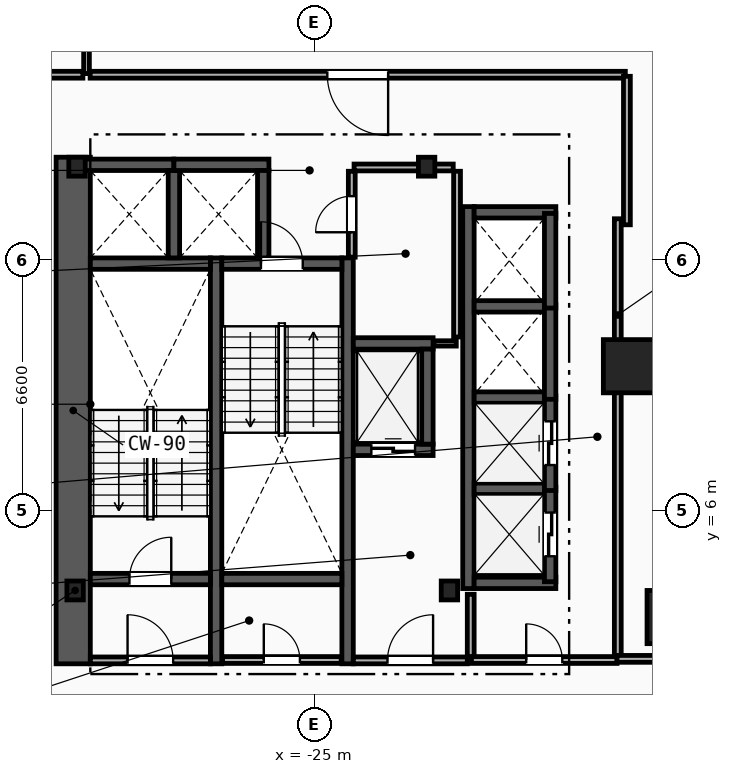
"""IFC4 building model, lengths in metres.
Left out: names, types, materials, properties, quantities, classifications, styles, units other than length and angle.
Written with IfcOpenShell. Run it as: python <this file> out.ifc"""

import sys

from ifc_helpers import new_model, si_unit, direction, frame, frame_2d, origin, origin_2d, place, context, subcontext, project, spatial, rectangle, i_section, extrude, element, fill, save


model = new_model("IFC4")
c1 = context("Model", 3, precision=1e-05, world=origin(), true_north=direction((0.0, 1.0)))
c2 = subcontext(c1, "Body", "Model", "MODEL_VIEW")
j1 = project(units=[si_unit("LENGTHUNIT", "METRE"), si_unit("PLANEANGLEUNIT", "RADIAN")], contexts=[c1])
p1 = place(None, origin())
s1 = spatial("IfcSite", under=j1, at=p1, CompositionType="ELEMENT")
p2 = place(p1, origin())
s2 = spatial("IfcBuilding", under=s1, at=p2, CompositionType="ELEMENT")
p3 = place(p2, frame((0.0, 0.0, 16.0)))
s3 = spatial("IfcBuildingStorey", under=s2, at=p3, CompositionType="ELEMENT", Elevation=16.0)
for number, where, z_axis, x_axis in (
    (1, (-31.3, 3.9, 0.0), (0.0, 0.0, 1.0), (1.0, 0.0, 0.0)),
    (2, (-21.45, 3.9, 0.0), (0.0, 0.0, 1.0), (1.0, 0.0, 0.0)),
    (3, (-22.05, 15.05, 0.0), (0.0, 0.0, 1.0), (1.0, 0.0, 0.0)),
    (4, (-31.25, 15.05, 0.0), (0.0, 0.0, 1.0), (1.0, 0.0, 0.0)),
):
    element("IfcColumn", number, at=place(p3, frame(where, z_axis=z_axis, x_axis=x_axis)), inside=s3, PredefinedType="COLUMN", context=c2, shape_type="SweptSolid", body=[
        extrude(i_section(OverallWidth=0.432, OverallDepth=0.498, WebThickness=0.056, FlangeThickness=0.089, FilletRadius=0.018, at=origin_2d()), origin(), (0.0, 0.0, 1.0), 4.0),
    ])
for number, where, z_axis, x_axis in (
    (5, (-15.55, 3.2, 0.0), (0.0, 0.0, 1.0), (1.0, 0.0, 0.0)),
    (6, (-16.7, 9.8, 0.0), (0.0, 0.0, 1.0), (1.0, 0.0, 0.0)),
):
    element("IfcColumn", number, at=place(p3, frame(where, z_axis=z_axis, x_axis=x_axis)), inside=s3, PredefinedType="COLUMN", context=c2, shape_type="SweptSolid", body=[
        extrude(rectangle(XDim=1.4, YDim=1.4, at=origin_2d()), origin(), (0.0, 0.0, 1.0), 4.0),
    ])
p4 = place(p3, frame((-31.35, 1.97, 0.0), z_axis=(0.0, 0.0, 1.0), x_axis=(0.0, 1.0, 0.0)))
e7 = element("IfcWall", 7, at=p4, inside=s3, PredefinedType="SHEAR", context=c2, shape_type="SweptSolid", body=[
    extrude(rectangle(XDim=13.33, YDim=0.9, at=frame_2d((6.665, 0.0))), origin(), (0.0, 0.0, 1.0), 3.65),
])
for number, where, z_axis, x_axis in (
    (8, (-27.59, 1.97, 0.0), (0.0, 0.0, 1.0), (0.0, 1.0, 0.0)),
    (9, (-24.13, 1.97, 0.0), (0.0, 0.0, 1.0), (0.0, 1.0, 0.0)),
):
    element("IfcWall", number, at=place(p3, frame(where, z_axis=z_axis, x_axis=x_axis)), inside=s3, PredefinedType="SHEAR", context=c2, shape_type="SweptSolid", body=[
        extrude(rectangle(XDim=10.68, YDim=0.3, at=frame_2d((5.34, 0.0))), origin(), (0.0, 0.0, 1.0), 3.65),
    ])
p5 = place(p3, frame((-30.9, 4.2, 0.0), z_axis=(0.0, 0.0, 1.0), x_axis=(1.0, 0.0, 0.0)))
e10 = element("IfcWall", 10, at=p5, inside=s3, PredefinedType="SHEAR", context=c2, shape_type="SweptSolid", body=[
    extrude(rectangle(XDim=3.16, YDim=0.3, at=frame_2d((1.58, 0.0))), origin(), (0.0, 0.0, 1.0), 3.65),
])
p6 = place(p5, frame((1.03, 0.0, 0.0)))
e11 = element("IfcOpeningElement", 11, at=p6, cuts=e10, PredefinedType="OPENING", context=c2, shape_type="SweptSolid", body=[
    extrude(rectangle(XDim=1.1, YDim=2.15, at=frame_2d((0.55, 1.075))), frame((0.0, 0.16, 0.0), z_axis=(0.0, -1.0, 0.0), x_axis=(1.0, 0.0, 0.0)), (0.0, 0.0, 1.0), 0.32),
])
p7 = place(p3, frame((-30.9, 12.5, 0.0), z_axis=(0.0, 0.0, 1.0), x_axis=(1.0, 0.0, 0.0)))
e12 = element("IfcWall", 12, at=p7, inside=s3, PredefinedType="SHEAR", context=c2, shape_type="SweptSolid", body=[
    extrude(rectangle(XDim=3.16, YDim=0.3, at=frame_2d((1.58, 0.0))), origin(), (0.0, 0.0, 1.0), 3.65),
])
p8 = place(p3, frame((-27.44, 12.5, 0.0), z_axis=(0.0, 0.0, 1.0), x_axis=(1.0, 0.0, 0.0)))
e13 = element("IfcWall", 13, at=p8, inside=s3, PredefinedType="SHEAR", context=c2, shape_type="SweptSolid", body=[
    extrude(rectangle(XDim=3.16, YDim=0.3, at=frame_2d((1.58, 0.0))), origin(), (0.0, 0.0, 1.0), 3.65),
])
p9 = place(p8, frame((1.03, 0.0, 0.0)))
e14 = element("IfcOpeningElement", 14, at=p9, cuts=e13, PredefinedType="OPENING", context=c2, shape_type="SweptSolid", body=[
    extrude(rectangle(XDim=1.1, YDim=2.15, at=frame_2d((0.55, 1.075))), frame((0.0, 0.16, 0.0), z_axis=(0.0, -1.0, 0.0), x_axis=(1.0, 0.0, 0.0)), (0.0, 0.0, 1.0), 0.32),
])
p10 = place(p3, frame((-27.44, 4.2, 0.0), z_axis=(0.0, 0.0, 1.0), x_axis=(1.0, 0.0, 0.0)))
e15 = element("IfcWall", 15, at=p10, inside=s3, PredefinedType="SHEAR", context=c2, shape_type="SweptSolid", body=[
    extrude(rectangle(XDim=3.16, YDim=0.3, at=frame_2d((1.58, 0.0))), origin(), (0.0, 0.0, 1.0), 3.65),
])
p11 = place(p3, frame((-20.89, 2.15, 0.0), z_axis=(0.0, 0.0, 1.0), x_axis=(0.0, 1.0, 0.0)))
e16 = element("IfcWall", 16, at=p11, inside=s3, PredefinedType="PARTITIONING", context=c2, shape_type="SweptSolid", body=[
    extrude(rectangle(XDim=1.65, YDim=0.18, at=frame_2d((0.825, 0.0))), origin(), (0.0, 0.0, 1.0), 3.65),
])
p12 = place(p3, frame((-23.98, 2.06, 0.0), z_axis=(0.0, 0.0, 1.0), x_axis=(1.0, 0.0, 0.0)))
e17 = element("IfcWall", 17, at=p12, inside=s3, PredefinedType="PARTITIONING", context=c2, shape_type="SweptSolid", body=[
    extrude(rectangle(XDim=3.0, YDim=0.18, at=frame_2d((1.5, 0.0))), origin(), (0.0, 0.0, 1.0), 3.65),
])
p13 = place(p12, frame((0.9, 0.0, 0.0)))
e18 = element("IfcOpeningElement", 18, at=p13, cuts=e17, PredefinedType="OPENING", context=c2, shape_type="SweptSolid", body=[
    extrude(rectangle(XDim=1.2, YDim=2.15, at=frame_2d((0.6, 1.075))), frame((0.0, 0.1, 0.0), z_axis=(0.0, -1.0, 0.0), x_axis=(1.0, 0.0, 0.0)), (0.0, 0.0, 1.0), 0.2),
])
p14 = place(p3, frame((-30.9, 2.06, 0.0), z_axis=(0.0, 0.0, 1.0), x_axis=(1.0, 0.0, 0.0)))
e19 = element("IfcWall", 19, at=p14, inside=s3, PredefinedType="PARTITIONING", context=c2, shape_type="SweptSolid", body=[
    extrude(rectangle(XDim=3.16, YDim=0.18, at=frame_2d((1.58, 0.0))), origin(), (0.0, 0.0, 1.0), 3.65),
])
p15 = place(p14, frame((0.98, 0.0, 0.0)))
e20 = element("IfcOpeningElement", 20, at=p15, cuts=e19, PredefinedType="OPENING", context=c2, shape_type="SweptSolid", body=[
    extrude(rectangle(XDim=1.2, YDim=2.15, at=frame_2d((0.6, 1.075))), frame((0.0, 0.1, 0.0), z_axis=(0.0, -1.0, 0.0), x_axis=(1.0, 0.0, 0.0)), (0.0, 0.0, 1.0), 0.2),
])
p16 = place(p3, frame((-23.98, 7.6, 0.0), z_axis=(0.0, 0.0, 1.0), x_axis=(1.0, 0.0, 0.0)))
e21 = element("IfcWall", 21, at=p16, inside=s3, PredefinedType="SHEAR", context=c2, shape_type="SweptSolid", body=[
    extrude(rectangle(XDim=2.1, YDim=0.3, at=frame_2d((1.05, 0.0))), origin(), (0.0, 0.0, 1.0), 3.65),
])
p17 = place(p16, frame((0.475, 0.0, 0.0)))
e22 = element("IfcOpeningElement", 22, at=p17, cuts=e21, PredefinedType="OPENING", context=c2, shape_type="SweptSolid", body=[
    extrude(rectangle(XDim=1.15, YDim=2.2, at=frame_2d((0.575, 1.1))), frame((0.0, 0.16, 0.0), z_axis=(0.0, -1.0, 0.0), x_axis=(1.0, 0.0, 0.0)), (0.0, 0.0, 1.0), 0.32),
])
p18 = place(p3, frame((-23.98, 10.4, 0.0), z_axis=(0.0, 0.0, 1.0), x_axis=(1.0, 0.0, 0.0)))
e23 = element("IfcWall", 23, at=p18, inside=s3, PredefinedType="SHEAR", context=c2, shape_type="SweptSolid", body=[
    extrude(rectangle(XDim=2.1, YDim=0.3, at=frame_2d((1.05, 0.0))), origin(), (0.0, 0.0, 1.0), 3.65),
])
for number, where, z_axis, x_axis in (
    (24, (-22.03, 7.75, 0.0), (0.0, 0.0, 1.0), (0.0, 1.0, 0.0)),
    (25, (-31.2, 15.1, 0.0), (0.0, 0.0, 1.0), (1.0, 0.0, 0.0)),
):
    element("IfcWall", number, at=place(p3, frame(where, z_axis=z_axis, x_axis=x_axis)), inside=s3, PredefinedType="SHEAR", context=c2, shape_type="SweptSolid", body=[
        extrude(rectangle(XDim=2.5, YDim=0.3, at=frame_2d((1.25, 0.0))), origin(), (0.0, 0.0, 1.0), 3.65),
    ])
p19 = place(p3, frame((-28.7, 12.65, 0.0), z_axis=(0.0, 0.0, 1.0), x_axis=(0.0, 1.0, 0.0)))
e26 = element("IfcWall", 26, at=p19, inside=s3, PredefinedType="SHEAR", context=c2, shape_type="SweptSolid", body=[
    extrude(rectangle(XDim=2.3, YDim=0.3, at=frame_2d((1.15, 0.0))), origin(), (0.0, 0.0, 1.0), 3.65),
])
p20 = place(p3, frame((-28.7, 15.1, 0.0), z_axis=(0.0, 0.0, 1.0), x_axis=(1.0, 0.0, 0.0)))
e27 = element("IfcWall", 27, at=p20, inside=s3, PredefinedType="SHEAR", context=c2, shape_type="SweptSolid", body=[
    extrude(rectangle(XDim=2.5, YDim=0.3, at=frame_2d((1.25, 0.0))), origin(), (0.0, 0.0, 1.0), 3.65),
])
p21 = place(p3, frame((-26.35, 12.65, 0.0), z_axis=(0.0, 0.0, 1.0), x_axis=(0.0, 1.0, 0.0)))
e28 = element("IfcWall", 28, at=p21, inside=s3, PredefinedType="SHEAR", context=c2, shape_type="SweptSolid", body=[
    extrude(rectangle(XDim=2.3, YDim=0.3, at=frame_2d((1.15, 0.0))), origin(), (0.0, 0.0, 1.0), 3.65),
])
p22 = place(p3, frame((-20.95, 3.95, 0.0), z_axis=(0.0, 0.0, 1.0), x_axis=(0.0, 1.0, 0.0)))
e29 = element("IfcWall", 29, at=p22, inside=s3, PredefinedType="SHEAR", context=c2, shape_type="SweptSolid", body=[
    extrude(rectangle(XDim=10.05, YDim=0.3, at=frame_2d((5.025, 0.0))), origin(), (0.0, 0.0, 1.0), 3.65),
])
for number, where, z_axis, x_axis in (
    (30, (-20.8, 4.1, 0.0), (0.0, 0.0, 1.0), (1.0, 0.0, 0.0)),
    (31, (-20.8, 13.85, 0.0), (0.0, 0.0, 1.0), (1.0, 0.0, 0.0)),
):
    element("IfcWall", number, at=place(p3, frame(where, z_axis=z_axis, x_axis=x_axis)), inside=s3, PredefinedType="SHEAR", context=c2, shape_type="SweptSolid", body=[
        extrude(rectangle(XDim=2.15, YDim=0.3, at=frame_2d((1.075, 0.0))), origin(), (0.0, 0.0, 1.0), 3.65),
    ])
for number, where, z_axis, x_axis in (
    (32, (-20.8, 6.575, 0.0), (0.0, 0.0, 1.0), (1.0, 0.0, 0.0)),
    (33, (-20.8, 8.975, 0.0), (0.0, 0.0, 1.0), (1.0, 0.0, 0.0)),
    (34, (-20.8, 11.375, 0.0), (0.0, 0.0, 1.0), (1.0, 0.0, 0.0)),
):
    element("IfcWall", number, at=place(p3, frame(where, z_axis=z_axis, x_axis=x_axis)), inside=s3, PredefinedType="SHEAR", context=c2, shape_type="SweptSolid", body=[
        extrude(rectangle(XDim=1.85, YDim=0.3, at=frame_2d((0.925, 0.0))), origin(), (0.0, 0.0, 1.0), 3.65),
    ])
p23 = place(p3, frame((-18.8, 4.13, 0.0), z_axis=(0.0, 0.0, 1.0), x_axis=(0.0, 1.0, 0.0)))
e35 = element("IfcWall", 35, at=p23, inside=s3, PredefinedType="SHEAR", context=c2, shape_type="SweptSolid", body=[
    extrude(rectangle(XDim=2.49, YDim=0.3, at=frame_2d((1.245, 0.0))), origin(), (0.0, 0.0, 1.0), 3.65),
])
p24 = place(p23, frame((0.67, 0.0, 0.0)))
e36 = element("IfcOpeningElement", 36, at=p24, cuts=e35, PredefinedType="OPENING", context=c2, shape_type="SweptSolid", body=[
    extrude(rectangle(XDim=1.15, YDim=2.2, at=frame_2d((0.575, 1.1))), frame((0.0, 0.16, 0.0), z_axis=(0.0, -1.0, 0.0), x_axis=(1.0, 0.0, 0.0)), (0.0, 0.0, 1.0), 0.32),
])
p25 = place(p3, frame((-18.8, 6.53, 0.0), z_axis=(0.0, 0.0, 1.0), x_axis=(0.0, 1.0, 0.0)))
e37 = element("IfcWall", 37, at=p25, inside=s3, PredefinedType="SHEAR", context=c2, shape_type="SweptSolid", body=[
    extrude(rectangle(XDim=2.49, YDim=0.3, at=frame_2d((1.245, 0.0))), origin(), (0.0, 0.0, 1.0), 3.65),
])
p26 = place(p25, frame((0.67, 0.0, 0.0)))
e38 = element("IfcOpeningElement", 38, at=p26, cuts=e37, PredefinedType="OPENING", context=c2, shape_type="SweptSolid", body=[
    extrude(rectangle(XDim=1.15, YDim=2.2, at=frame_2d((0.575, 1.1))), frame((0.0, 0.16, 0.0), z_axis=(0.0, -1.0, 0.0), x_axis=(1.0, 0.0, 0.0)), (0.0, 0.0, 1.0), 0.32),
])
for number, where, z_axis, x_axis in (
    (39, (-18.8, 8.93, 0.0), (0.0, 0.0, 1.0), (0.0, 1.0, 0.0)),
    (40, (-18.8, 11.33, 0.0), (0.0, 0.0, 1.0), (0.0, 1.0, 0.0)),
):
    element("IfcWall", number, at=place(p3, frame(where, z_axis=z_axis, x_axis=x_axis)), inside=s3, PredefinedType="SHEAR", context=c2, shape_type="SweptSolid", body=[
        extrude(rectangle(XDim=2.49, YDim=0.3, at=frame_2d((1.245, 0.0))), origin(), (0.0, 0.0, 1.0), 3.65),
    ])
p27 = place(p3, frame((-17.02, 2.17, 0.0), z_axis=(0.0, 0.0, 1.0), x_axis=(0.0, 1.0, 0.0)))
e41 = element("IfcWall", 41, at=p27, inside=s3, PredefinedType="PARTITIONING", context=c2, shape_type="SweptSolid", body=[
    extrude(rectangle(XDim=11.51, YDim=0.18, at=frame_2d((5.755, 0.0))), origin(), (0.0, 0.0, 1.0), 3.65),
])
p28 = place(p3, frame((-20.87, 2.07, 0.0), z_axis=(0.0, 0.0, 1.0), x_axis=(1.0, 0.0, 0.0)))
e42 = element("IfcWall", 42, at=p28, inside=s3, PredefinedType="PARTITIONING", context=c2, shape_type="SweptSolid", body=[
    extrude(rectangle(XDim=3.83, YDim=0.18, at=frame_2d((1.915, 0.0))), origin(), (0.0, 0.0, 1.0), 3.65),
])
p29 = place(p28, frame((1.44, 0.0, 0.0)))
e43 = element("IfcOpeningElement", 43, at=p29, cuts=e42, PredefinedType="OPENING", context=c2, shape_type="SweptSolid", body=[
    extrude(rectangle(XDim=0.95, YDim=2.1, at=frame_2d((0.475, 1.05))), frame((0.0, 0.1, 0.0), z_axis=(0.0, -1.0, 0.0), x_axis=(1.0, 0.0, 0.0)), (0.0, 0.0, 1.0), 0.2),
])
p30 = place(p3, frame((-21.86, 10.4, 0.0), z_axis=(0.0, 0.0, 1.0), x_axis=(1.0, 0.0, 0.0)))
e44 = element("IfcWall", 44, at=p30, inside=s3, PredefinedType="PARTITIONING", context=c2, shape_type="SweptSolid", body=[
    extrude(rectangle(XDim=0.59, YDim=0.14, at=frame_2d((0.295, 0.0))), origin(), (0.0, 0.0, 1.0), 3.65),
])
p31 = place(p3, frame((-21.25, 10.57, 0.0), z_axis=(0.0, 0.0, 1.0), x_axis=(0.0, 1.0, 0.0)))
e45 = element("IfcWall", 45, at=p31, inside=s3, PredefinedType="PARTITIONING", context=c2, shape_type="SweptSolid", body=[
    extrude(rectangle(XDim=4.36, YDim=0.18, at=frame_2d((2.18, 0.0))), origin(), (0.0, 0.0, 1.0), 3.65),
])
p32 = place(p3, frame((-23.96, 15.03, 0.0), z_axis=(0.0, 0.0, 1.0), x_axis=(1.0, 0.0, 0.0)))
e46 = element("IfcWall", 46, at=p32, inside=s3, PredefinedType="PARTITIONING", context=c2, shape_type="SweptSolid", body=[
    extrude(rectangle(XDim=2.61, YDim=0.18, at=frame_2d((1.305, 0.0))), origin(), (0.0, 0.0, 1.0), 2.723),
])
p33 = place(p3, frame((-27.42, 2.07, 0.0), z_axis=(0.0, 0.0, 1.0), x_axis=(1.0, 0.0, 0.0)))
e47 = element("IfcWall", 47, at=p33, inside=s3, PredefinedType="PARTITIONING", context=c2, shape_type="SweptSolid", body=[
    extrude(rectangle(XDim=3.12, YDim=0.18, at=frame_2d((1.56, 0.0))), origin(), (0.0, 0.0, 1.0), 3.65),
])
p34 = place(p33, frame((1.085, 0.0, 0.0)))
e48 = element("IfcOpeningElement", 48, at=p34, cuts=e47, PredefinedType="OPENING", context=c2, shape_type="SweptSolid", body=[
    extrude(rectangle(XDim=0.95, YDim=2.1, at=frame_2d((0.475, 1.05))), frame((0.0, 0.1, 0.0), z_axis=(0.0, -1.0, 0.0), x_axis=(1.0, 0.0, 0.0)), (0.0, 0.0, 1.0), 0.2),
])
p35 = place(p3, frame((-24.02, 12.67, 0.0), z_axis=(0.0, 0.0, 1.0), x_axis=(0.0, 1.0, 0.0)))
e49 = element("IfcWall", 49, at=p35, inside=s3, PredefinedType="PARTITIONING", context=c2, shape_type="SweptSolid", body=[
    extrude(rectangle(XDim=2.26, YDim=0.18, at=frame_2d((1.13, 0.0))), origin(), (0.0, 0.0, 1.0), 3.65),
])
p36 = place(p35, frame((0.655, 0.0, 0.0)))
e50 = element("IfcOpeningElement", 50, at=p36, cuts=e49, PredefinedType="OPENING", context=c2, shape_type="SweptSolid", body=[
    extrude(rectangle(XDim=0.95, YDim=2.1, at=frame_2d((0.475, 1.05))), frame((0.0, 0.1, 0.0), z_axis=(0.0, -1.0, 0.0), x_axis=(1.0, 0.0, 0.0)), (0.0, 0.0, 1.0), 0.2),
])
p37 = place(p3, frame((-31.0, 17.5, 0.0), z_axis=(0.0, 0.0, 1.0), x_axis=(0.0, 1.0, 0.0)))
e51 = element("IfcWall", 51, at=p37, inside=s3, PredefinedType="PARTITIONING", context=c2, shape_type="SweptSolid", body=[
    extrude(rectangle(XDim=8.471, YDim=0.15, at=frame_2d((4.236, 0.0))), origin(), (0.0, 0.0, 1.0), 3.65),
])
p38 = place(p37, frame((3.536, 0.0, 1.05)))
e52 = element("IfcOpeningElement", 52, at=p38, cuts=e51, PredefinedType="OPENING", context=c2, shape_type="SweptSolid", body=[
    extrude(rectangle(XDim=1.4, YDim=1.5, at=frame_2d((0.7, 0.75))), frame((0.0, 0.085, 0.0), z_axis=(0.0, -1.0, 0.0), x_axis=(1.0, 0.0, 0.0)), (0.0, 0.0, 1.0), 0.17),
])
p39 = place(p3, frame((-31.095, 17.47, 0.0), z_axis=(0.0, 0.0, 1.0), x_axis=(-1.0, 0.0, 0.0)))
e53 = element("IfcWall", 53, at=p39, inside=s3, PredefinedType="PARTITIONING", context=c2, shape_type="SweptSolid", body=[
    extrude(rectangle(XDim=2.533, YDim=0.18, at=frame_2d((1.267, 0.0))), origin(), (0.0, 0.0, 1.0), 2.877),
])
p40 = place(p3, frame((-16.822, 17.47, 0.0), z_axis=(0.0, 0.0, 1.0), x_axis=(-1.0, 0.0, 0.0)))
e54 = element("IfcWall", 54, at=p40, inside=s3, PredefinedType="PARTITIONING", context=c2, shape_type="SweptSolid", body=[
    extrude(rectangle(XDim=14.083, YDim=0.18, at=frame_2d((7.042, 0.0))), origin(), (0.0, 0.0, 1.0), 3.65),
])
p41 = place(p40, frame((6.242, 0.0, 0.0)))
e55 = element("IfcOpeningElement", 55, at=p41, cuts=e54, PredefinedType="OPENING", context=c2, shape_type="SweptSolid", body=[
    extrude(rectangle(XDim=1.6, YDim=2.2, at=frame_2d((0.8, 1.1))), frame((0.0, 0.1, 0.0), z_axis=(0.0, -1.0, 0.0), x_axis=(1.0, 0.0, 0.0)), (0.0, 0.0, 1.0), 0.2),
])
p42 = place(p3, frame((-16.78, 13.521, 0.0), z_axis=(0.0, 0.0, 1.0), x_axis=(0.0, 1.0, 0.0)))
e56 = element("IfcWall", 56, at=p42, inside=s3, PredefinedType="PARTITIONING", context=c2, shape_type="SweptSolid", body=[
    extrude(rectangle(XDim=3.907, YDim=0.18, at=frame_2d((1.954, 0.0))), origin(), (0.0, 0.0, 1.0), 3.65),
])
p43 = place(p3, frame((-15.595, 2.1, 0.0), z_axis=(0.0, 0.0, 1.0), x_axis=(-1.0, 0.0, 0.0)))
e57 = element("IfcWall", 57, at=p43, inside=s3, PredefinedType="PARTITIONING", context=c2, shape_type="SweptSolid", body=[
    extrude(rectangle(XDim=1.445, YDim=0.18, at=frame_2d((0.723, 0.0))), origin(), (0.0, 0.0, 1.0), 3.65),
])
p44 = place(p6, origin())
e58 = element("IfcDoor", 58, at=p44, inside=s3, OperationType="SINGLE_SWING_RIGHT", PredefinedType="DOOR", context=c2, shape_type="SweptSolid", body=[
    extrude(rectangle(XDim=1.1, YDim=2.15, at=frame_2d((0.55, 1.075))), frame((0.0, 0.025, 0.0), z_axis=(0.0, -1.0, 0.0), x_axis=(1.0, 0.0, 0.0)), (0.0, 0.0, 1.0), 0.05),
])
fill(e11, e58)
p45 = place(p9, origin())
e59 = element("IfcDoor", 59, at=p45, inside=s3, OperationType="SINGLE_SWING_LEFT", PredefinedType="DOOR", context=c2, shape_type="SweptSolid", body=[
    extrude(rectangle(XDim=1.1, YDim=2.15, at=frame_2d((0.55, 1.075))), frame((0.0, 0.025, 0.0), z_axis=(0.0, -1.0, 0.0), x_axis=(1.0, 0.0, 0.0)), (0.0, 0.0, 1.0), 0.05),
])
fill(e14, e59)
p46 = place(p13, origin())
e60 = element("IfcDoor", 60, at=p46, inside=s3, OperationType="SINGLE_SWING_RIGHT", PredefinedType="DOOR", context=c2, shape_type="SweptSolid", body=[
    extrude(rectangle(XDim=1.2, YDim=2.15, at=frame_2d((0.6, 1.075))), frame((0.0, 0.025, 0.0), z_axis=(0.0, -1.0, 0.0), x_axis=(1.0, 0.0, 0.0)), (0.0, 0.0, 1.0), 0.05),
])
fill(e18, e60)
p47 = place(p15, origin())
e61 = element("IfcDoor", 61, at=p47, inside=s3, OperationType="SINGLE_SWING_LEFT", PredefinedType="DOOR", context=c2, shape_type="SweptSolid", body=[
    extrude(rectangle(XDim=1.2, YDim=2.15, at=frame_2d((0.6, 1.075))), frame((0.0, 0.025, 0.0), z_axis=(0.0, -1.0, 0.0), x_axis=(1.0, 0.0, 0.0)), (0.0, 0.0, 1.0), 0.05),
])
fill(e20, e61)
p48 = place(p17, origin())
e62 = element("IfcDoor", 62, at=p48, inside=s3, OperationType="SLIDING_TO_LEFT", PredefinedType="TRAPDOOR", context=c2, shape_type="SweptSolid", body=[
    extrude(rectangle(XDim=1.15, YDim=2.2, at=frame_2d((0.575, 1.1))), frame((0.0, 0.025, 0.0), z_axis=(0.0, -1.0, 0.0), x_axis=(1.0, 0.0, 0.0)), (0.0, 0.0, 1.0), 0.05),
])
fill(e22, e62)
p49 = place(p24, origin())
e63 = element("IfcDoor", 63, at=p49, inside=s3, OperationType="SLIDING_TO_LEFT", PredefinedType="TRAPDOOR", context=c2, shape_type="SweptSolid", body=[
    extrude(rectangle(XDim=1.15, YDim=2.2, at=frame_2d((0.575, 1.1))), frame((0.0, 0.025, 0.0), z_axis=(0.0, -1.0, 0.0), x_axis=(1.0, 0.0, 0.0)), (0.0, 0.0, 1.0), 0.05),
])
fill(e36, e63)
p50 = place(p26, origin())
e64 = element("IfcDoor", 64, at=p50, inside=s3, OperationType="SLIDING_TO_LEFT", PredefinedType="TRAPDOOR", context=c2, shape_type="SweptSolid", body=[
    extrude(rectangle(XDim=1.15, YDim=2.2, at=frame_2d((0.575, 1.1))), frame((0.0, 0.025, 0.0), z_axis=(0.0, -1.0, 0.0), x_axis=(1.0, 0.0, 0.0)), (0.0, 0.0, 1.0), 0.05),
])
fill(e38, e64)
p51 = place(p41, origin())
e65 = element("IfcDoor", 65, at=p51, inside=s3, OperationType="SINGLE_SWING_LEFT", PredefinedType="DOOR", context=c2, shape_type="SweptSolid", body=[
    extrude(rectangle(XDim=1.6, YDim=2.2, at=frame_2d((0.8, 1.1))), frame((0.0, 0.025, 0.0), z_axis=(0.0, -1.0, 0.0), x_axis=(1.0, 0.0, 0.0)), (0.0, 0.0, 1.0), 0.05),
])
fill(e55, e65)
p52 = place(p29, origin())
e66 = element("IfcDoor", 66, at=p52, inside=s3, OperationType="SINGLE_SWING_LEFT", PredefinedType="DOOR", context=c2, shape_type="SweptSolid", body=[
    extrude(rectangle(XDim=0.95, YDim=2.1, at=frame_2d((0.475, 1.05))), frame((0.0, 0.025, 0.0), z_axis=(0.0, -1.0, 0.0), x_axis=(1.0, 0.0, 0.0)), (0.0, 0.0, 1.0), 0.05),
])
fill(e43, e66)
p53 = place(p34, origin())
e67 = element("IfcDoor", 67, at=p53, inside=s3, OperationType="SINGLE_SWING_LEFT", PredefinedType="DOOR", context=c2, shape_type="SweptSolid", body=[
    extrude(rectangle(XDim=0.95, YDim=2.1, at=frame_2d((0.475, 1.05))), frame((0.0, 0.025, 0.0), z_axis=(0.0, -1.0, 0.0), x_axis=(1.0, 0.0, 0.0)), (0.0, 0.0, 1.0), 0.05),
])
fill(e48, e67)
p54 = place(p36, origin())
e68 = element("IfcDoor", 68, at=p54, inside=s3, OperationType="SINGLE_SWING_LEFT", PredefinedType="DOOR", context=c2, shape_type="SweptSolid", body=[
    extrude(rectangle(XDim=0.95, YDim=2.1, at=frame_2d((0.475, 1.05))), frame((0.0, 0.025, 0.0), z_axis=(0.0, -1.0, 0.0), x_axis=(1.0, 0.0, 0.0)), (0.0, 0.0, 1.0), 0.05),
])
fill(e50, e68)
save(model, sys.argv[1])
